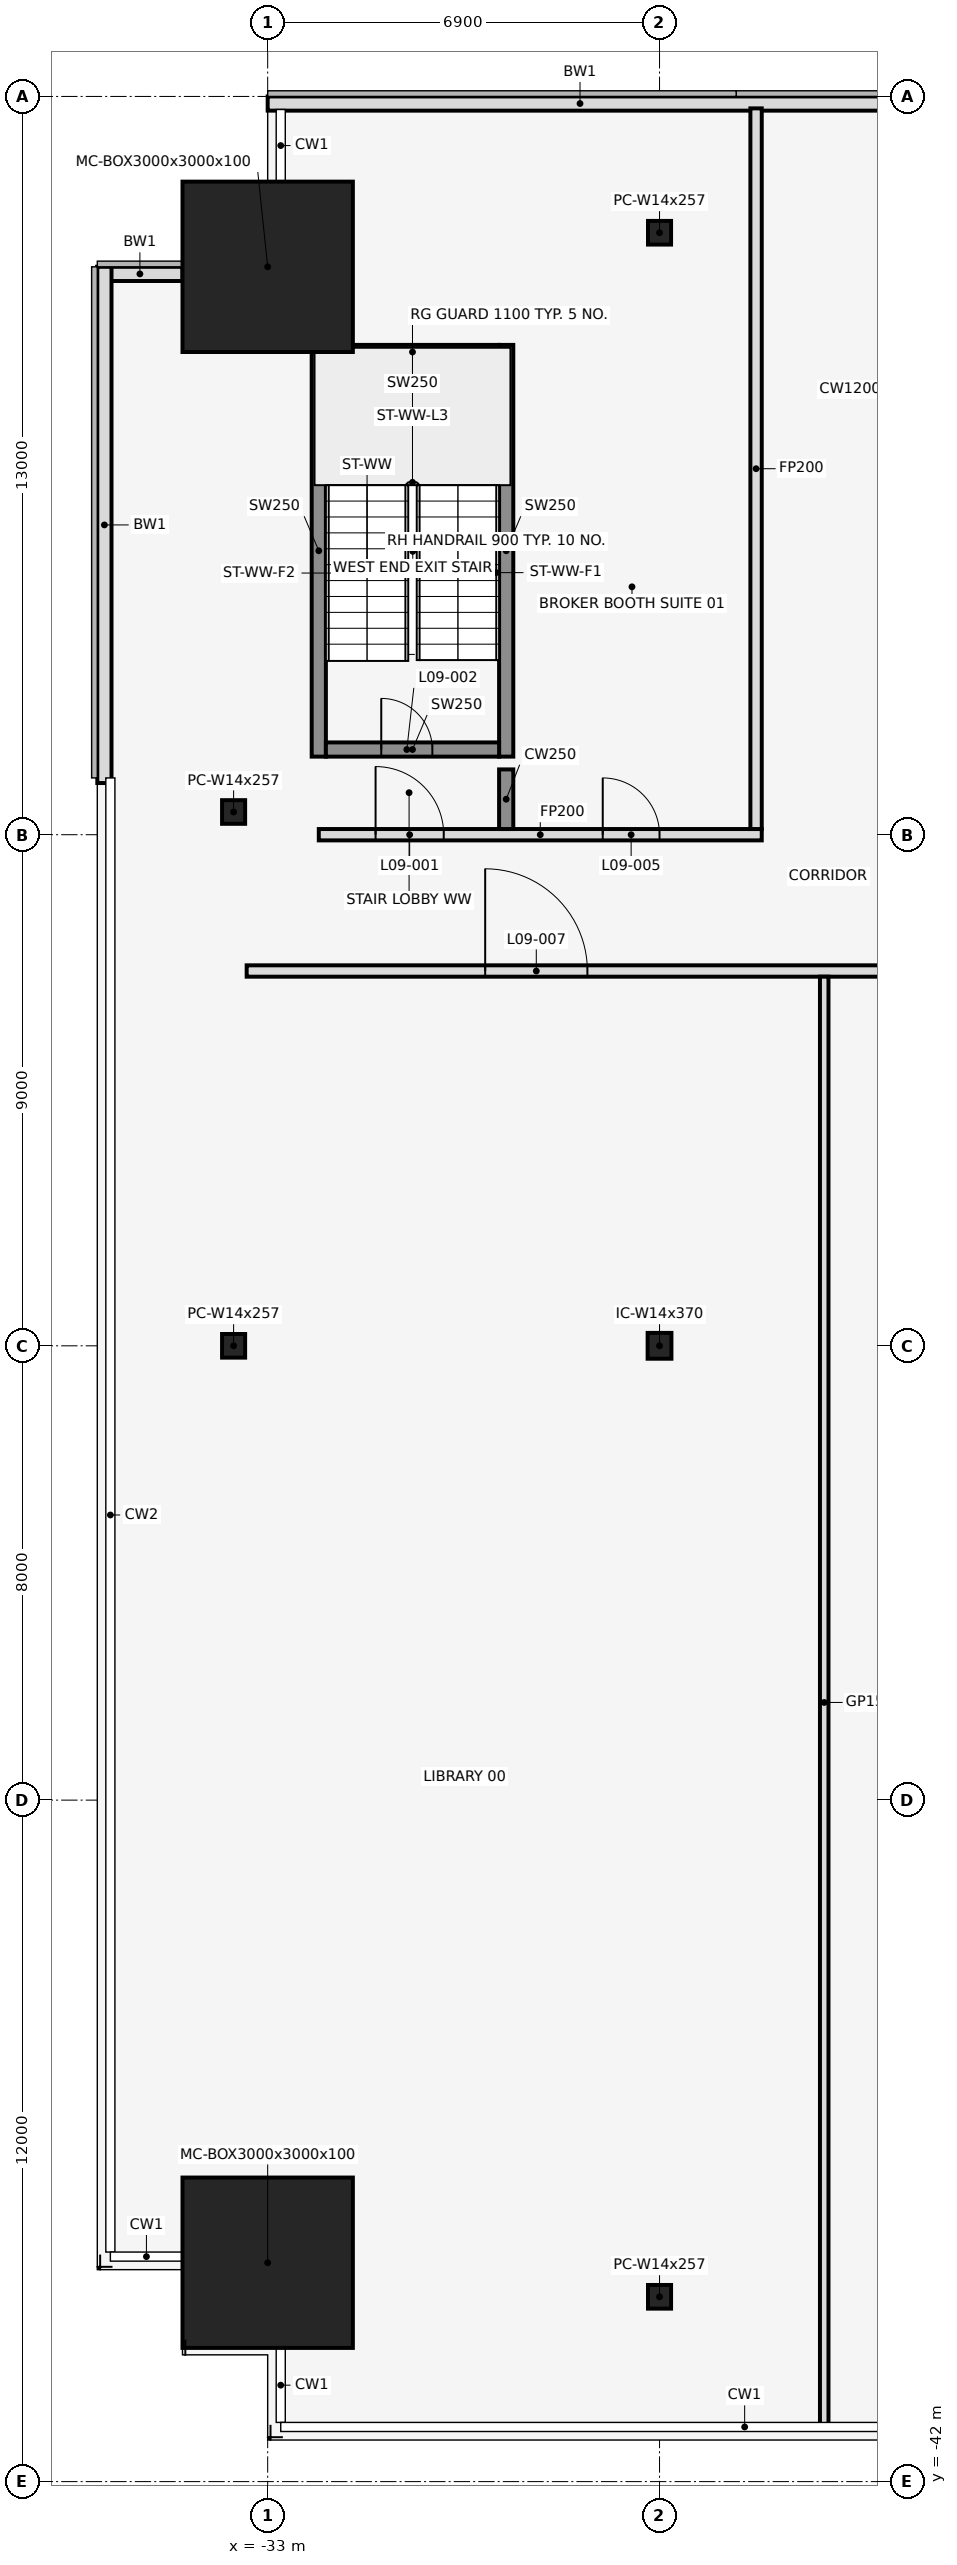
"""IFC4 building model, lengths in metres.
Left out: names, types, materials, properties, quantities, classifications, styles, units other than length and angle.
Written with IfcOpenShell. Run it as: python <this file> out.ifc"""

import sys

from ifc_helpers import new_model, si_unit, direction, frame, frame_2d, origin, origin_2d, place, context, subcontext, project, spatial, rectangle, hollow_rectangle, i_section, extrude, element, fill, save


model = new_model("IFC4")
c1 = context("Model", 3, precision=1e-05, world=origin(), true_north=direction((0.0, 1.0)))
c2 = subcontext(c1, "Body", "Model", "MODEL_VIEW")
j1 = project(units=[si_unit("LENGTHUNIT", "METRE"), si_unit("PLANEANGLEUNIT", "RADIAN")], contexts=[c1])
p1 = place(None, origin())
s1 = spatial("IfcSite", under=j1, at=p1, CompositionType="ELEMENT")
p2 = place(p1, origin())
s2 = spatial("IfcBuilding", under=s1, at=p2, CompositionType="ELEMENT")
p3 = place(p2, frame((0.0, 0.0, 48.5)))
s3 = spatial("IfcBuildingStorey", under=s2, at=p3, CompositionType="ELEMENT", Elevation=48.5)
for number, where, z_axis, x_axis in (
    (1, (-33.0, -38.146, 0.0), (0.0, 0.0, 1.0), (1.0, 0.0, 0.0)),
    (2, (-33.0, -3.0, 0.0), (0.0, 0.0, 1.0), (1.0, 0.0, 0.0)),
):
    element("IfcColumn", number, at=place(p3, frame(where, z_axis=z_axis, x_axis=x_axis)), inside=s3, PredefinedType="COLUMN", context=c2, shape_type="SweptSolid", body=[
        extrude(hollow_rectangle(XDim=3.0, YDim=3.0, WallThickness=0.1, at=origin_2d()), origin(), (0.0, 0.0, 1.0), 4.5),
    ])
for number, where, z_axis, x_axis in (
    (3, (-26.1, -38.746, 0.0), (0.0, 0.0, 1.0), (1.0, 0.0, 0.0)),
    (4, (-26.1, -2.4, 0.0), (0.0, 0.0, 1.0), (1.0, 0.0, 0.0)),
    (5, (-33.6, -12.6, 0.0), (0.0, 0.0, 1.0), (1.0, 0.0, 0.0)),
    (6, (-33.6, -22.0, 0.0), (0.0, 0.0, 1.0), (1.0, 0.0, 0.0)),
):
    element("IfcColumn", number, at=place(p3, frame(where, z_axis=z_axis, x_axis=x_axis)), inside=s3, PredefinedType="COLUMN", context=c2, shape_type="SweptSolid", body=[
        extrude(i_section(OverallWidth=0.406, OverallDepth=0.417, WebThickness=0.03, FlangeThickness=0.048, at=origin_2d()), origin(), (0.0, 0.0, 1.0), 4.5),
    ])
p4 = place(p3, frame((-26.1, -22.0, 0.0), z_axis=(0.0, 0.0, 1.0), x_axis=(1.0, 0.0, 0.0)))
e7 = element("IfcColumn", 7, at=p4, inside=s3, PredefinedType="COLUMN", context=c2, shape_type="SweptSolid", body=[
    extrude(i_section(OverallWidth=0.419, OverallDepth=0.455, WebThickness=0.042, FlangeThickness=0.068, at=origin_2d()), origin(), (0.0, 0.0, 1.0), 4.5),
])
p5 = place(p3, frame((-22.0, -0.125, 0.0), z_axis=(0.0, 0.0, 1.0), x_axis=(-1.0, 0.0, 0.0)))
e8 = element("IfcWall", 8, at=p5, inside=s3, PredefinedType="STANDARD", context=c2, shape_type="SweptSolid", body=[
    extrude(rectangle(XDim=11.0, YDim=0.25, at=frame_2d((5.5, 0.0))), origin(), (0.0, 0.0, 1.0), 4.35),
])
p6 = place(p3, frame((-34.5, -3.125, 0.0), z_axis=(0.0, 0.0, 1.0), x_axis=(-1.0, 0.0, 0.0)))
e9 = element("IfcWall", 9, at=p6, inside=s3, PredefinedType="STANDARD", context=c2, shape_type="SweptSolid", body=[
    extrude(rectangle(XDim=1.5, YDim=0.25, at=frame_2d((0.75, 0.0))), origin(), (0.0, 0.0, 1.0), 4.35),
])
p7 = place(p3, frame((-35.875, -3.0, 0.0), z_axis=(0.0, 0.0, 1.0), x_axis=(0.0, -1.0, 0.0)))
e10 = element("IfcWall", 10, at=p7, inside=s3, PredefinedType="STANDARD", context=c2, shape_type="SweptSolid", body=[
    extrude(rectangle(XDim=9.09, YDim=0.25, at=frame_2d((4.545, 0.0))), origin(), (0.0, 0.0, 1.0), 4.35),
])
for number, where, z_axis, x_axis in (
    (11, (-32.1, -11.625, 0.0), (0.0, 0.0, 1.0), (0.0, 1.0, 0.0)),
    (12, (-28.8, -11.625, 0.0), (0.0, 0.0, 1.0), (0.0, 1.0, 0.0)),
):
    element("IfcWall", number, at=place(p3, frame(where, z_axis=z_axis, x_axis=x_axis)), inside=s3, PredefinedType="SHEAR", context=c2, shape_type="SweptSolid", body=[
        extrude(rectangle(XDim=7.25, YDim=0.25, at=frame_2d((3.625, 0.0))), origin(), (0.0, 0.0, 1.0), 4.5),
    ])
p8 = place(p3, frame((-31.975, -11.5, 0.0), z_axis=(0.0, 0.0, 1.0), x_axis=(1.0, 0.0, 0.0)))
e13 = element("IfcWall", 13, at=p8, inside=s3, PredefinedType="SHEAR", context=c2, shape_type="SweptSolid", body=[
    extrude(rectangle(XDim=3.05, YDim=0.25, at=frame_2d((1.525, 0.0))), origin(), (0.0, 0.0, 1.0), 4.5),
])
p9 = place(p8, frame((0.975, 0.0, 0.0)))
e14 = element("IfcOpeningElement", 14, at=p9, cuts=e13, PredefinedType="OPENING", context=c2, shape_type="SweptSolid", body=[
    extrude(rectangle(XDim=0.9, YDim=2.1, at=frame_2d((0.45, 1.05))), frame((0.0, 0.137, 0.0), z_axis=(0.0, -1.0, 0.0), x_axis=(1.0, 0.0, 0.0)), (0.0, 0.0, 1.0), 0.274),
])
p10 = place(p3, frame((-31.975, -4.5, 0.0), z_axis=(0.0, 0.0, 1.0), x_axis=(1.0, 0.0, 0.0)))
e15 = element("IfcWall", 15, at=p10, inside=s3, PredefinedType="SHEAR", context=c2, shape_type="SweptSolid", body=[
    extrude(rectangle(XDim=3.05, YDim=0.25, at=frame_2d((1.525, 0.0))), origin(), (0.0, 0.0, 1.0), 4.5),
])
p11 = place(p3, frame((-33.37, -15.4, 0.0), z_axis=(0.0, 0.0, 1.0), x_axis=(1.0, 0.0, 0.0)))
e16 = element("IfcWall", 16, at=p11, inside=s3, PredefinedType="PARTITIONING", context=c2, shape_type="SweptSolid", body=[
    extrude(rectangle(XDim=66.74, YDim=0.2, at=frame_2d((33.37, 0.0))), origin(), (0.0, 0.0, 1.0), 3.418),
])
p12 = place(p11, frame((4.2, 0.0, 0.0)))
e17 = element("IfcOpeningElement", 17, at=p12, cuts=e16, PredefinedType="OPENING", context=c2, shape_type="SweptSolid", body=[
    extrude(rectangle(XDim=1.8, YDim=2.1, at=frame_2d((0.9, 1.05))), frame((0.0, 0.112, 0.0), z_axis=(0.0, -1.0, 0.0), x_axis=(1.0, 0.0, 0.0)), (0.0, 0.0, 1.0), 0.224),
])
p13 = place(p11, frame((12.57, 0.0, 0.0)))
e18 = element("IfcOpeningElement", 18, at=p13, cuts=e16, PredefinedType="OPENING", context=c2, shape_type="SweptSolid", body=[
    extrude(rectangle(XDim=1.0, YDim=2.1, at=frame_2d((0.5, 1.05))), frame((0.0, 0.112, 0.0), z_axis=(0.0, -1.0, 0.0), x_axis=(1.0, 0.0, 0.0)), (0.0, 0.0, 1.0), 0.224),
])
p14 = place(p11, frame((22.27, 0.0, 0.0)))
e19 = element("IfcOpeningElement", 19, at=p14, cuts=e16, PredefinedType="OPENING", context=c2, shape_type="SweptSolid", body=[
    extrude(rectangle(XDim=1.8, YDim=2.1, at=frame_2d((0.9, 1.05))), frame((0.0, 0.112, 0.0), z_axis=(0.0, -1.0, 0.0), x_axis=(1.0, 0.0, 0.0)), (0.0, 0.0, 1.0), 0.224),
])
p15 = place(p11, frame((33.87, 0.0, 0.0)))
e20 = element("IfcOpeningElement", 20, at=p15, cuts=e16, PredefinedType="OPENING", context=c2, shape_type="SweptSolid", body=[
    extrude(rectangle(XDim=1.8, YDim=2.1, at=frame_2d((0.9, 1.05))), frame((0.0, 0.112, 0.0), z_axis=(0.0, -1.0, 0.0), x_axis=(1.0, 0.0, 0.0)), (0.0, 0.0, 1.0), 0.224),
])
p16 = place(p11, frame((41.57, 0.0, 0.0)))
e21 = element("IfcOpeningElement", 21, at=p16, cuts=e16, PredefinedType="OPENING", context=c2, shape_type="SweptSolid", body=[
    extrude(rectangle(XDim=1.0, YDim=2.1, at=frame_2d((0.5, 1.05))), frame((0.0, 0.112, 0.0), z_axis=(0.0, -1.0, 0.0), x_axis=(1.0, 0.0, 0.0)), (0.0, 0.0, 1.0), 0.224),
])
p17 = place(p11, frame((46.97, 0.0, 0.0)))
e22 = element("IfcOpeningElement", 22, at=p17, cuts=e16, PredefinedType="OPENING", context=c2, shape_type="SweptSolid", body=[
    extrude(rectangle(XDim=1.8, YDim=2.1, at=frame_2d((0.9, 1.05))), frame((0.0, 0.112, 0.0), z_axis=(0.0, -1.0, 0.0), x_axis=(1.0, 0.0, 0.0)), (0.0, 0.0, 1.0), 0.224),
])
p18 = place(p11, frame((54.67, 0.0, 0.0)))
e23 = element("IfcOpeningElement", 23, at=p18, cuts=e16, PredefinedType="OPENING", context=c2, shape_type="SweptSolid", body=[
    extrude(rectangle(XDim=0.9, YDim=2.1, at=frame_2d((0.45, 1.05))), frame((0.0, 0.112, 0.0), z_axis=(0.0, -1.0, 0.0), x_axis=(1.0, 0.0, 0.0)), (0.0, 0.0, 1.0), 0.224),
])
p19 = place(p11, frame((62.57, 0.0, 0.0)))
e24 = element("IfcOpeningElement", 24, at=p19, cuts=e16, PredefinedType="OPENING", context=c2, shape_type="SweptSolid", body=[
    extrude(rectangle(XDim=1.0, YDim=2.1, at=frame_2d((0.5, 1.05))), frame((0.0, 0.112, 0.0), z_axis=(0.0, -1.0, 0.0), x_axis=(1.0, 0.0, 0.0)), (0.0, 0.0, 1.0), 0.224),
])
p20 = place(p3, frame((-32.1, -13.0, 0.0), z_axis=(0.0, 0.0, 1.0), x_axis=(1.0, 0.0, 0.0)))
e25 = element("IfcWall", 25, at=p20, inside=s3, PredefinedType="PARTITIONING", context=c2, shape_type="SweptSolid", body=[
    extrude(rectangle(XDim=7.8, YDim=0.2, at=frame_2d((3.9, 0.0))), origin(), (0.0, 0.0, 1.0), 3.418),
])
p21 = place(p20, frame((1.0, 0.0, 0.0)))
e26 = element("IfcOpeningElement", 26, at=p21, cuts=e25, PredefinedType="OPENING", context=c2, shape_type="SweptSolid", body=[
    extrude(rectangle(XDim=1.2, YDim=2.1, at=frame_2d((0.6, 1.05))), frame((0.0, 0.112, 0.0), z_axis=(0.0, -1.0, 0.0), x_axis=(1.0, 0.0, 0.0)), (0.0, 0.0, 1.0), 0.224),
])
p22 = place(p20, frame((5.0, 0.0, 0.0)))
e27 = element("IfcOpeningElement", 27, at=p22, cuts=e25, PredefinedType="OPENING", context=c2, shape_type="SweptSolid", body=[
    extrude(rectangle(XDim=1.0, YDim=2.1, at=frame_2d((0.5, 1.05))), frame((0.0, 0.112, 0.0), z_axis=(0.0, -1.0, 0.0), x_axis=(1.0, 0.0, 0.0)), (0.0, 0.0, 1.0), 0.224),
])
p23 = place(p3, frame((-28.8, -12.9, 0.0), z_axis=(0.0, 0.0, 1.0), x_axis=(0.0, 1.0, 0.0)))
e28 = element("IfcWall", 28, at=p23, inside=s3, PredefinedType="SHEAR", context=c2, shape_type="SweptSolid", body=[
    extrude(rectangle(XDim=1.05, YDim=0.25, at=frame_2d((0.525, 0.0))), origin(), (0.0, 0.0, 1.0), 4.5),
])
p24 = place(p3, frame((-24.4, -12.9, 0.0), z_axis=(0.0, 0.0, 1.0), x_axis=(0.0, 1.0, 0.0)))
e29 = element("IfcWall", 29, at=p24, inside=s3, PredefinedType="PARTITIONING", context=c2, shape_type="SweptSolid", body=[
    extrude(rectangle(XDim=12.69, YDim=0.2, at=frame_2d((6.345, 0.0))), origin(), (0.0, 0.0, 1.0), 3.418),
])
p25 = place(p3, frame((-23.2, -41.06, 0.0), z_axis=(0.0, 0.0, 1.0), x_axis=(0.0, 1.0, 0.0)))
e30 = element("IfcWall", 30, at=p25, inside=s3, PredefinedType="PARTITIONING", context=c2, shape_type="SweptSolid", body=[
    extrude(rectangle(XDim=25.56, YDim=0.15, at=frame_2d((12.78, 0.0))), origin(), (0.0, 0.0, 1.0), 3.418),
])
p26 = place(p21, origin())
e31 = element("IfcDoor", 31, at=p26, inside=s3, OperationType="SINGLE_SWING_LEFT", PredefinedType="DOOR", context=c2, shape_type="SweptSolid", body=[
    extrude(rectangle(XDim=1.2, YDim=2.1, at=frame_2d((0.6, 1.05))), frame((0.0, 0.025, 0.0), z_axis=(0.0, -1.0, 0.0), x_axis=(1.0, 0.0, 0.0)), (0.0, 0.0, 1.0), 0.05),
])
fill(e26, e31)
p27 = place(p9, origin())
e32 = element("IfcDoor", 32, at=p27, inside=s3, OperationType="SINGLE_SWING_LEFT", PredefinedType="DOOR", context=c2, shape_type="SweptSolid", body=[
    extrude(rectangle(XDim=0.9, YDim=2.1, at=frame_2d((0.45, 1.05))), frame((0.0, 0.025, 0.0), z_axis=(0.0, -1.0, 0.0), x_axis=(1.0, 0.0, 0.0)), (0.0, 0.0, 1.0), 0.05),
])
fill(e14, e32)
p28 = place(p22, origin())
e33 = element("IfcDoor", 33, at=p28, inside=s3, OperationType="SINGLE_SWING_LEFT", PredefinedType="DOOR", context=c2, shape_type="SweptSolid", body=[
    extrude(rectangle(XDim=1.0, YDim=2.1, at=frame_2d((0.5, 1.05))), frame((0.0, 0.025, 0.0), z_axis=(0.0, -1.0, 0.0), x_axis=(1.0, 0.0, 0.0)), (0.0, 0.0, 1.0), 0.05),
])
fill(e27, e33)
p29 = place(p12, origin())
e34 = element("IfcDoor", 34, at=p29, inside=s3, OperationType="SINGLE_SWING_LEFT", PredefinedType="DOOR", context=c2, shape_type="SweptSolid", body=[
    extrude(rectangle(XDim=1.8, YDim=2.1, at=frame_2d((0.9, 1.05))), frame((0.0, 0.025, 0.0), z_axis=(0.0, -1.0, 0.0), x_axis=(1.0, 0.0, 0.0)), (0.0, 0.0, 1.0), 0.05),
])
fill(e17, e34)
save(model, sys.argv[1])
